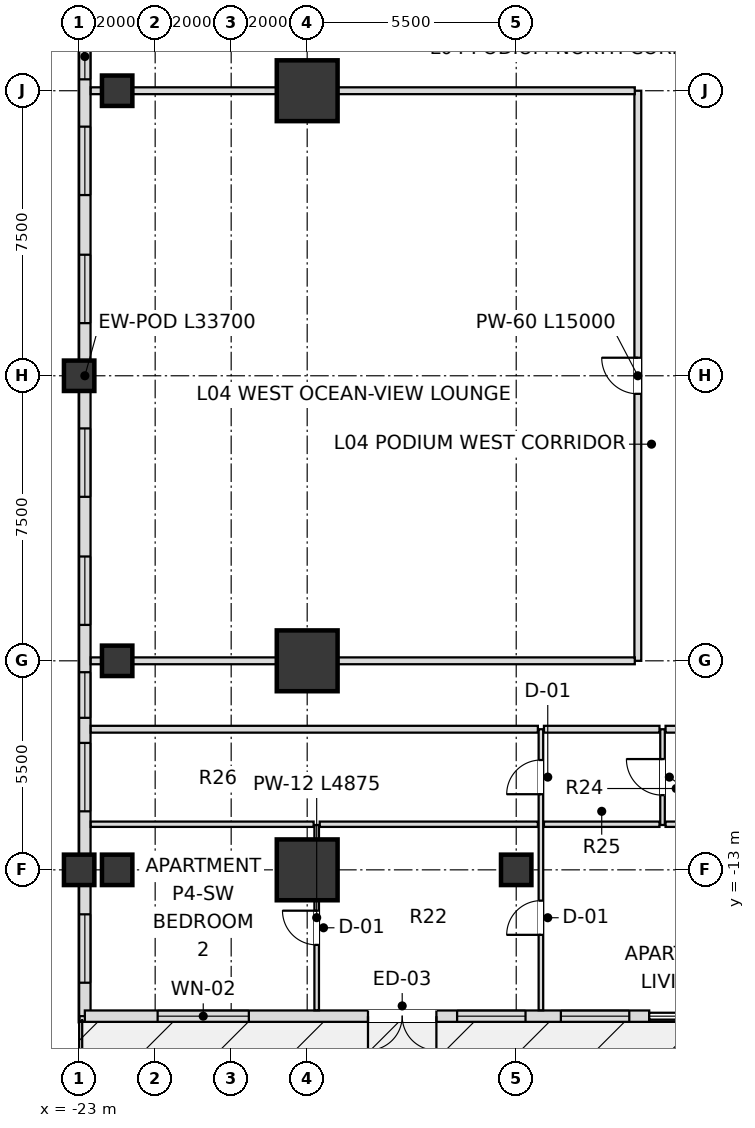
"""IFC4 building model, lengths in metres.
Left out: names, types, materials, properties, quantities, classifications, styles, units other than length and angle.
Written with IfcOpenShell. Run it as: python <this file> out.ifc"""

import sys

from ifc_helpers import new_model, si_unit, direction, frame, frame_2d, origin, origin_2d, place, context, subcontext, project, spatial, rectangle, extrude, element, fill, save


model = new_model("IFC4")
c1 = context("Model", 3, precision=1e-05, world=origin(), true_north=direction((0.0, 1.0)))
c2 = subcontext(c1, "Body", "Model", "MODEL_VIEW")
j1 = project(units=[si_unit("LENGTHUNIT", "METRE"), si_unit("PLANEANGLEUNIT", "RADIAN")], contexts=[c1])
p1 = place(None, origin())
s1 = spatial("IfcSite", under=j1, at=p1, CompositionType="ELEMENT")
p2 = place(p1, origin())
s2 = spatial("IfcBuilding", under=s1, at=p2, CompositionType="ELEMENT")
p3 = place(p2, frame((0.0, 0.0, 22.2)))
s3 = spatial("IfcBuildingStorey", under=s2, at=p3, CompositionType="ELEMENT", Elevation=22.2)
for number, where, z_axis, x_axis in (
    (1, (-17.0, 7.5, 0.0), (0.0, 0.0, 1.0), (1.0, 0.0, 0.0)),
    (2, (-17.0, -7.5, 0.0), (0.0, 0.0, 1.0), (1.0, 0.0, 0.0)),
    (3, (-17.0, -13.0, 0.0), (0.0, 0.0, 1.0), (1.0, 0.0, 0.0)),
):
    element("IfcColumn", number, at=place(p3, frame(where, z_axis=z_axis, x_axis=x_axis)), inside=s3, PredefinedType="USERDEFINED", context=c2, shape_type="SweptSolid", body=[
        extrude(rectangle(XDim=1.6, YDim=1.6, at=origin_2d()), origin(), (0.0, 0.0, 1.0), 5.4),
    ])
for number, where, z_axis, x_axis in (
    (4, (-23.0, -13.0, 0.0), (0.0, 0.0, 1.0), (1.0, 0.0, 0.0)),
    (5, (-23.0, 0.0, 0.0), (0.0, 0.0, 1.0), (1.0, 0.0, 0.0)),
    (6, (-11.5, -13.0, 0.0), (0.0, 0.0, 1.0), (1.0, 0.0, 0.0)),
    (7, (-22.0, -13.0, 0.0), (0.0, 0.0, 1.0), (1.0, 0.0, 0.0)),
    (8, (-22.0, -7.5, 0.0), (0.0, 0.0, 1.0), (1.0, 0.0, 0.0)),
    (9, (-22.0, 7.5, 0.0), (0.0, 0.0, 1.0), (1.0, 0.0, 0.0)),
):
    element("IfcColumn", number, at=place(p3, frame(where, z_axis=z_axis, x_axis=x_axis)), inside=s3, PredefinedType="COLUMN", context=c2, shape_type="SweptSolid", body=[
        extrude(rectangle(XDim=0.8, YDim=0.8, at=origin_2d()), origin(), (0.0, 0.0, 1.0), 5.4),
    ])
p4 = place(p3, frame((-22.85, 16.85, 0.0), z_axis=(0.0, 0.0, 1.0), x_axis=(0.0, -1.0, 0.0)))
e10 = element("IfcWall", 10, at=p4, inside=s3, PredefinedType="SOLIDWALL", context=c2, shape_type="SweptSolid", body=[
    extrude(rectangle(XDim=33.7, YDim=0.3, at=frame_2d((16.85, 0.0))), origin(), (0.0, 0.0, 1.0), 2.985),
])
p5 = place(p4, frame((0.88, 0.0, 0.72)))
e11 = element("IfcOpeningElement", 11, at=p5, cuts=e10, PredefinedType="OPENING", context=c2, shape_type="SweptSolid", body=[
    extrude(rectangle(XDim=1.8, YDim=1.68, at=frame_2d((0.9, 0.84))), frame((0.0, 0.16, 0.0), z_axis=(0.0, -1.0, 0.0), x_axis=(1.0, 0.0, 0.0)), (0.0, 0.0, 1.0), 0.32),
])
p6 = place(p4, frame((5.39, 0.0, 0.72)))
e12 = element("IfcOpeningElement", 12, at=p6, cuts=e10, PredefinedType="OPENING", context=c2, shape_type="SweptSolid", body=[
    extrude(rectangle(XDim=1.8, YDim=1.68, at=frame_2d((0.9, 0.84))), frame((0.0, 0.16, 0.0), z_axis=(0.0, -1.0, 0.0), x_axis=(1.0, 0.0, 0.0)), (0.0, 0.0, 1.0), 0.32),
])
p7 = place(p4, frame((7.85, 0.0, 0.72)))
e13 = element("IfcOpeningElement", 13, at=p7, cuts=e10, PredefinedType="OPENING", context=c2, shape_type="SweptSolid", body=[
    extrude(rectangle(XDim=1.2, YDim=1.68, at=frame_2d((0.6, 0.84))), frame((0.0, 0.16, 0.0), z_axis=(0.0, -1.0, 0.0), x_axis=(1.0, 0.0, 0.0)), (0.0, 0.0, 1.0), 0.32),
])
p8 = place(p4, frame((10.295, 0.0, 0.72)))
e14 = element("IfcOpeningElement", 14, at=p8, cuts=e10, PredefinedType="OPENING", context=c2, shape_type="SweptSolid", body=[
    extrude(rectangle(XDim=1.8, YDim=1.68, at=frame_2d((0.9, 0.84))), frame((0.0, 0.16, 0.0), z_axis=(0.0, -1.0, 0.0), x_axis=(1.0, 0.0, 0.0)), (0.0, 0.0, 1.0), 0.32),
])
p9 = place(p4, frame((13.665, 0.0, 0.72)))
e15 = element("IfcOpeningElement", 15, at=p9, cuts=e10, PredefinedType="OPENING", context=c2, shape_type="SweptSolid", body=[
    extrude(rectangle(XDim=1.8, YDim=1.68, at=frame_2d((0.9, 0.84))), frame((0.0, 0.16, 0.0), z_axis=(0.0, -1.0, 0.0), x_axis=(1.0, 0.0, 0.0)), (0.0, 0.0, 1.0), 0.32),
])
p10 = place(p4, frame((18.235, 0.0, 0.72)))
e16 = element("IfcOpeningElement", 16, at=p10, cuts=e10, PredefinedType="OPENING", context=c2, shape_type="SweptSolid", body=[
    extrude(rectangle(XDim=1.8, YDim=1.68, at=frame_2d((0.9, 0.84))), frame((0.0, 0.16, 0.0), z_axis=(0.0, -1.0, 0.0), x_axis=(1.0, 0.0, 0.0)), (0.0, 0.0, 1.0), 0.32),
])
p11 = place(p4, frame((21.605, 0.0, 0.72)))
e17 = element("IfcOpeningElement", 17, at=p11, cuts=e10, PredefinedType="OPENING", context=c2, shape_type="SweptSolid", body=[
    extrude(rectangle(XDim=1.8, YDim=1.68, at=frame_2d((0.9, 0.84))), frame((0.0, 0.16, 0.0), z_axis=(0.0, -1.0, 0.0), x_axis=(1.0, 0.0, 0.0)), (0.0, 0.0, 1.0), 0.32),
])
p12 = place(p4, frame((24.65, 0.0, 0.72)))
e18 = element("IfcOpeningElement", 18, at=p12, cuts=e10, PredefinedType="OPENING", context=c2, shape_type="SweptSolid", body=[
    extrude(rectangle(XDim=1.2, YDim=1.68, at=frame_2d((0.6, 0.84))), frame((0.0, 0.16, 0.0), z_axis=(0.0, -1.0, 0.0), x_axis=(1.0, 0.0, 0.0)), (0.0, 0.0, 1.0), 0.32),
])
p13 = place(p4, frame((26.51, 0.0, 0.72)))
e19 = element("IfcOpeningElement", 19, at=p13, cuts=e10, PredefinedType="OPENING", context=c2, shape_type="SweptSolid", body=[
    extrude(rectangle(XDim=1.8, YDim=1.68, at=frame_2d((0.9, 0.84))), frame((0.0, 0.16, 0.0), z_axis=(0.0, -1.0, 0.0), x_axis=(1.0, 0.0, 0.0)), (0.0, 0.0, 1.0), 0.32),
])
p14 = place(p4, frame((31.02, 0.0, 0.72)))
e20 = element("IfcOpeningElement", 20, at=p14, cuts=e10, PredefinedType="OPENING", context=c2, shape_type="SweptSolid", body=[
    extrude(rectangle(XDim=1.8, YDim=1.68, at=frame_2d((0.9, 0.84))), frame((0.0, 0.16, 0.0), z_axis=(0.0, -1.0, 0.0), x_axis=(1.0, 0.0, 0.0)), (0.0, 0.0, 1.0), 0.32),
])
p15 = place(p3, frame((-8.0, -16.85, 0.0), z_axis=(0.0, 0.0, 1.0), x_axis=(-1.0, 0.0, 0.0)))
e21 = element("IfcWall", 21, at=p15, inside=s3, PredefinedType="SOLIDWALL", context=c2, shape_type="SweptSolid", body=[
    extrude(rectangle(XDim=14.85, YDim=0.3, at=frame_2d((7.425, 0.0))), origin(), (0.0, 0.0, 1.0), 4.356),
])
p16 = place(p15, frame((5.6, 0.0, 0.0)))
e22 = element("IfcOpeningElement", 22, at=p16, cuts=e21, PredefinedType="OPENING", context=c2, shape_type="SweptSolid", body=[
    extrude(rectangle(XDim=1.8, YDim=2.3, at=frame_2d((0.9, 1.15))), frame((0.0, 0.16, 0.0), z_axis=(0.0, -1.0, 0.0), x_axis=(1.0, 0.0, 0.0)), (0.0, 0.0, 1.0), 0.32),
])
p17 = place(p15, frame((0.525, 0.0, 0.72)))
e23 = element("IfcOpeningElement", 23, at=p17, cuts=e21, PredefinedType="OPENING", context=c2, shape_type="SweptSolid", body=[
    extrude(rectangle(XDim=1.8, YDim=1.68, at=frame_2d((0.9, 0.84))), frame((0.0, 0.16, 0.0), z_axis=(0.0, -1.0, 0.0), x_axis=(1.0, 0.0, 0.0)), (0.0, 0.0, 1.0), 0.32),
])
p18 = place(p15, frame((3.255, 0.0, 0.72)))
e24 = element("IfcOpeningElement", 24, at=p18, cuts=e21, PredefinedType="OPENING", context=c2, shape_type="SweptSolid", body=[
    extrude(rectangle(XDim=1.8, YDim=1.68, at=frame_2d((0.9, 0.84))), frame((0.0, 0.16, 0.0), z_axis=(0.0, -1.0, 0.0), x_axis=(1.0, 0.0, 0.0)), (0.0, 0.0, 1.0), 0.32),
])
p19 = place(p15, frame((10.535, 0.0, 0.8)))
e25 = element("IfcOpeningElement", 25, at=p19, cuts=e21, PredefinedType="OPENING", context=c2, shape_type="SweptSolid", body=[
    extrude(rectangle(XDim=2.4, YDim=2.2, at=frame_2d((1.2, 1.1))), frame((0.0, 0.16, 0.0), z_axis=(0.0, -1.0, 0.0), x_axis=(1.0, 0.0, 0.0)), (0.0, 0.0, 1.0), 0.32),
])
p20 = place(p3, frame((-16.75, -16.695, 0.0), z_axis=(0.0, 0.0, 1.0), x_axis=(0.0, 1.0, 0.0)))
e26 = element("IfcWall", 26, at=p20, inside=s3, PredefinedType="PARTITIONING", context=c2, shape_type="SweptSolid", body=[
    extrude(rectangle(XDim=4.875, YDim=0.12, at=frame_2d((2.438, 0.0))), origin(), (0.0, 0.0, 1.0), 2.985),
])
p21 = place(p20, frame((1.721, 0.0, 0.0)))
e27 = element("IfcOpeningElement", 27, at=p21, cuts=e26, PredefinedType="OPENING", context=c2, shape_type="SweptSolid", body=[
    extrude(rectangle(XDim=0.9, YDim=2.1, at=frame_2d((0.45, 1.05))), frame((0.0, 0.07, 0.0), z_axis=(0.0, -1.0, 0.0), x_axis=(1.0, 0.0, 0.0)), (0.0, 0.0, 1.0), 0.14),
])
p22 = place(p3, frame((-10.85, -16.695, 0.0), z_axis=(0.0, 0.0, 1.0), x_axis=(0.0, 1.0, 0.0)))
e28 = element("IfcWall", 28, at=p22, inside=s3, PredefinedType="PARTITIONING", context=c2, shape_type="SweptSolid", body=[
    extrude(rectangle(XDim=7.395, YDim=0.12, at=frame_2d((3.698, 0.0))), origin(), (0.0, 0.0, 1.0), 4.436),
])
p23 = place(p22, frame((5.685, 0.0, 0.0)))
e29 = element("IfcOpeningElement", 29, at=p23, cuts=e28, PredefinedType="OPENING", context=c2, shape_type="SweptSolid", body=[
    extrude(rectangle(XDim=0.9, YDim=2.1, at=frame_2d((0.45, 1.05))), frame((0.0, 0.07, 0.0), z_axis=(0.0, -1.0, 0.0), x_axis=(1.0, 0.0, 0.0)), (0.0, 0.0, 1.0), 0.14),
])
p24 = place(p22, frame((1.985, 0.0, 0.0)))
e30 = element("IfcOpeningElement", 30, at=p24, cuts=e28, PredefinedType="OPENING", context=c2, shape_type="SweptSolid", body=[
    extrude(rectangle(XDim=0.9, YDim=2.1, at=frame_2d((0.45, 1.05))), frame((0.0, 0.07, 0.0), z_axis=(0.0, -1.0, 0.0), x_axis=(1.0, 0.0, 0.0)), (0.0, 0.0, 1.0), 0.14),
])
p25 = place(p3, frame((-8.3, -7.5, 0.0), z_axis=(0.0, 0.0, 1.0), x_axis=(0.0, 1.0, 0.0)))
e31 = element("IfcWall", 31, at=p25, inside=s3, PredefinedType="PARTITIONING", context=c2, shape_type="SweptSolid", body=[
    extrude(rectangle(XDim=15.0, YDim=0.18, at=frame_2d((7.5, 0.0))), origin(), (0.0, 0.0, 1.0), 5.0),
])
p26 = place(p25, frame((7.025, 0.0, 0.0)))
e32 = element("IfcOpeningElement", 32, at=p26, cuts=e31, PredefinedType="OPENING", context=c2, shape_type="SweptSolid", body=[
    extrude(rectangle(XDim=0.95, YDim=2.15, at=frame_2d((0.475, 1.075))), frame((0.0, 0.1, 0.0), z_axis=(0.0, -1.0, 0.0), x_axis=(1.0, 0.0, 0.0)), (0.0, 0.0, 1.0), 0.2),
])
p27 = place(p3, frame((-7.65, -11.82, 0.0), z_axis=(0.0, 0.0, 1.0), x_axis=(0.0, 1.0, 0.0)))
e33 = element("IfcWall", 33, at=p27, inside=s3, PredefinedType="PARTITIONING", context=c2, shape_type="SweptSolid", body=[
    extrude(rectangle(XDim=2.52, YDim=0.12, at=frame_2d((1.26, 0.0))), origin(), (0.0, 0.0, 1.0), 5.0),
])
p28 = place(p27, frame((0.785, 0.0, 0.0)))
e34 = element("IfcOpeningElement", 34, at=p28, cuts=e33, PredefinedType="OPENING", context=c2, shape_type="SweptSolid", body=[
    extrude(rectangle(XDim=0.95, YDim=2.1, at=frame_2d((0.475, 1.05))), frame((0.0, 0.07, 0.0), z_axis=(0.0, -1.0, 0.0), x_axis=(1.0, 0.0, 0.0)), (0.0, 0.0, 1.0), 0.14),
])
p29 = place(p3, frame((-22.695, -11.8, 0.0), z_axis=(0.0, 0.0, 1.0), x_axis=(1.0, 0.0, 0.0)))
e35 = element("IfcWall", 35, at=p29, inside=s3, PredefinedType="PARTITIONING", context=c2, shape_type="SweptSolid", body=[
    extrude(rectangle(XDim=5.865, YDim=0.14, at=frame_2d((2.933, 0.0))), origin(), (0.0, 0.0, 1.0), 4.356),
])
p30 = place(p3, frame((-16.67, -11.8, 0.0), z_axis=(0.0, 0.0, 1.0), x_axis=(1.0, 0.0, 0.0)))
e36 = element("IfcWall", 36, at=p30, inside=s3, PredefinedType="PARTITIONING", context=c2, shape_type="SweptSolid", body=[
    extrude(rectangle(XDim=5.74, YDim=0.14, at=frame_2d((2.87, 0.0))), origin(), (0.0, 0.0, 1.0), 5.0),
])
p31 = place(p3, frame((-10.77, -11.8, 0.0), z_axis=(0.0, 0.0, 1.0), x_axis=(1.0, 0.0, 0.0)))
e37 = element("IfcWall", 37, at=p31, inside=s3, PredefinedType="PARTITIONING", context=c2, shape_type="SweptSolid", body=[
    extrude(rectangle(XDim=3.04, YDim=0.14, at=frame_2d((1.52, 0.0))), origin(), (0.0, 0.0, 1.0), 5.0),
])
p32 = place(p3, frame((-7.57, -11.8, 0.0), z_axis=(0.0, 0.0, 1.0), x_axis=(1.0, 0.0, 0.0)))
e38 = element("IfcWall", 38, at=p32, inside=s3, PredefinedType="PARTITIONING", context=c2, shape_type="SweptSolid", body=[
    extrude(rectangle(XDim=4.04, YDim=0.14, at=frame_2d((2.02, 0.0))), origin(), (0.0, 0.0, 1.0), 4.436),
])
p33 = place(p32, frame((1.545, 0.0, 0.0)))
e39 = element("IfcOpeningElement", 39, at=p33, cuts=e38, PredefinedType="OPENING", context=c2, shape_type="SweptSolid", body=[
    extrude(rectangle(XDim=0.95, YDim=2.1, at=frame_2d((0.475, 1.05))), frame((0.0, 0.08, 0.0), z_axis=(0.0, -1.0, 0.0), x_axis=(1.0, 0.0, 0.0)), (0.0, 0.0, 1.0), 0.16),
])
p34 = place(p3, frame((-22.695, -9.3, 0.0), z_axis=(0.0, 0.0, 1.0), x_axis=(1.0, 0.0, 0.0)))
e40 = element("IfcWall", 40, at=p34, inside=s3, PredefinedType="PARTITIONING", context=c2, shape_type="SweptSolid", body=[
    extrude(rectangle(XDim=11.765, YDim=0.18, at=frame_2d((5.883, 0.0))), origin(), (0.0, 0.0, 1.0), 4.356),
])
p35 = place(p3, frame((-10.77, -9.3, 0.0), z_axis=(0.0, 0.0, 1.0), x_axis=(1.0, 0.0, 0.0)))
e41 = element("IfcWall", 41, at=p35, inside=s3, PredefinedType="PARTITIONING", context=c2, shape_type="SweptSolid", body=[
    extrude(rectangle(XDim=3.04, YDim=0.18, at=frame_2d((1.52, 0.0))), origin(), (0.0, 0.0, 1.0), 5.0),
])
p36 = place(p3, frame((-7.57, -9.3, 0.0), z_axis=(0.0, 0.0, 1.0), x_axis=(1.0, 0.0, 0.0)))
e42 = element("IfcWall", 42, at=p36, inside=s3, PredefinedType="PARTITIONING", context=c2, shape_type="SweptSolid", body=[
    extrude(rectangle(XDim=4.04, YDim=0.18, at=frame_2d((2.02, 0.0))), origin(), (0.0, 0.0, 1.0), 4.436),
])
p37 = place(p36, frame((1.545, 0.0, 0.0)))
e43 = element("IfcOpeningElement", 43, at=p37, cuts=e42, PredefinedType="OPENING", context=c2, shape_type="SweptSolid", body=[
    extrude(rectangle(XDim=0.95, YDim=2.15, at=frame_2d((0.475, 1.075))), frame((0.0, 0.1, 0.0), z_axis=(0.0, -1.0, 0.0), x_axis=(1.0, 0.0, 0.0)), (0.0, 0.0, 1.0), 0.2),
])
for number, where, z_axis, x_axis in (
    (44, (-22.695, -7.5, 0.0), (0.0, 0.0, 1.0), (1.0, 0.0, 0.0)),
    (45, (-22.695, 7.5, 0.0), (0.0, 0.0, 1.0), (1.0, 0.0, 0.0)),
):
    element("IfcWall", number, at=place(p3, frame(where, z_axis=z_axis, x_axis=x_axis)), inside=s3, PredefinedType="PARTITIONING", context=c2, shape_type="SweptSolid", body=[
        extrude(rectangle(XDim=14.315, YDim=0.18, at=frame_2d((7.158, 0.0))), origin(), (0.0, 0.0, 1.0), 4.356),
    ])
p38 = place(p7, origin())
e46 = element("IfcWindow", 46, at=p38, inside=s3, PartitioningType="SINGLE_PANEL", PredefinedType="WINDOW", context=c2, shape_type="SweptSolid", body=[
    extrude(rectangle(XDim=1.2, YDim=1.68, at=frame_2d((0.6, 0.84))), frame((0.0, 0.03, 0.0), z_axis=(0.0, -1.0, 0.0), x_axis=(1.0, 0.0, 0.0)), (0.0, 0.0, 1.0), 0.06),
])
fill(e13, e46)
p39 = place(p8, origin())
e47 = element("IfcWindow", 47, at=p39, inside=s3, PartitioningType="SINGLE_PANEL", PredefinedType="WINDOW", context=c2, shape_type="SweptSolid", body=[
    extrude(rectangle(XDim=1.8, YDim=1.68, at=frame_2d((0.9, 0.84))), frame((0.0, 0.03, 0.0), z_axis=(0.0, -1.0, 0.0), x_axis=(1.0, 0.0, 0.0)), (0.0, 0.0, 1.0), 0.06),
])
fill(e14, e47)
p40 = place(p9, origin())
e48 = element("IfcWindow", 48, at=p40, inside=s3, PartitioningType="SINGLE_PANEL", PredefinedType="WINDOW", context=c2, shape_type="SweptSolid", body=[
    extrude(rectangle(XDim=1.8, YDim=1.68, at=frame_2d((0.9, 0.84))), frame((0.0, 0.03, 0.0), z_axis=(0.0, -1.0, 0.0), x_axis=(1.0, 0.0, 0.0)), (0.0, 0.0, 1.0), 0.06),
])
fill(e15, e48)
p41 = place(p10, origin())
e49 = element("IfcWindow", 49, at=p41, inside=s3, PartitioningType="SINGLE_PANEL", PredefinedType="WINDOW", context=c2, shape_type="SweptSolid", body=[
    extrude(rectangle(XDim=1.8, YDim=1.68, at=frame_2d((0.9, 0.84))), frame((0.0, 0.03, 0.0), z_axis=(0.0, -1.0, 0.0), x_axis=(1.0, 0.0, 0.0)), (0.0, 0.0, 1.0), 0.06),
])
fill(e16, e49)
p42 = place(p11, origin())
e50 = element("IfcWindow", 50, at=p42, inside=s3, PartitioningType="SINGLE_PANEL", PredefinedType="WINDOW", context=c2, shape_type="SweptSolid", body=[
    extrude(rectangle(XDim=1.8, YDim=1.68, at=frame_2d((0.9, 0.84))), frame((0.0, 0.03, 0.0), z_axis=(0.0, -1.0, 0.0), x_axis=(1.0, 0.0, 0.0)), (0.0, 0.0, 1.0), 0.06),
])
fill(e17, e50)
p43 = place(p12, origin())
e51 = element("IfcWindow", 51, at=p43, inside=s3, PartitioningType="SINGLE_PANEL", PredefinedType="WINDOW", context=c2, shape_type="SweptSolid", body=[
    extrude(rectangle(XDim=1.2, YDim=1.68, at=frame_2d((0.6, 0.84))), frame((0.0, 0.03, 0.0), z_axis=(0.0, -1.0, 0.0), x_axis=(1.0, 0.0, 0.0)), (0.0, 0.0, 1.0), 0.06),
])
fill(e18, e51)
p44 = place(p13, origin())
e52 = element("IfcWindow", 52, at=p44, inside=s3, PartitioningType="SINGLE_PANEL", PredefinedType="WINDOW", context=c2, shape_type="SweptSolid", body=[
    extrude(rectangle(XDim=1.8, YDim=1.68, at=frame_2d((0.9, 0.84))), frame((0.0, 0.03, 0.0), z_axis=(0.0, -1.0, 0.0), x_axis=(1.0, 0.0, 0.0)), (0.0, 0.0, 1.0), 0.06),
])
fill(e19, e52)
p45 = place(p14, origin())
e53 = element("IfcWindow", 53, at=p45, inside=s3, PartitioningType="SINGLE_PANEL", PredefinedType="WINDOW", context=c2, shape_type="SweptSolid", body=[
    extrude(rectangle(XDim=1.8, YDim=1.68, at=frame_2d((0.9, 0.84))), frame((0.0, 0.03, 0.0), z_axis=(0.0, -1.0, 0.0), x_axis=(1.0, 0.0, 0.0)), (0.0, 0.0, 1.0), 0.06),
])
fill(e20, e53)
p46 = place(p16, origin())
e54 = element("IfcDoor", 54, at=p46, inside=s3, OperationType="DOUBLE_DOOR_SINGLE_SWING", PredefinedType="DOOR", context=c2, shape_type="SweptSolid", body=[
    extrude(rectangle(XDim=1.8, YDim=2.3, at=frame_2d((0.9, 1.15))), frame((0.0, 0.025, 0.0), z_axis=(0.0, -1.0, 0.0), x_axis=(1.0, 0.0, 0.0)), (0.0, 0.0, 1.0), 0.05),
])
fill(e22, e54)
p47 = place(p17, origin())
e55 = element("IfcWindow", 55, at=p47, inside=s3, PartitioningType="SINGLE_PANEL", PredefinedType="WINDOW", context=c2, shape_type="SweptSolid", body=[
    extrude(rectangle(XDim=1.8, YDim=1.68, at=frame_2d((0.9, 0.84))), frame((0.0, 0.03, 0.0), z_axis=(0.0, -1.0, 0.0), x_axis=(1.0, 0.0, 0.0)), (0.0, 0.0, 1.0), 0.06),
])
fill(e23, e55)
p48 = place(p18, origin())
e56 = element("IfcWindow", 56, at=p48, inside=s3, PartitioningType="SINGLE_PANEL", PredefinedType="WINDOW", context=c2, shape_type="SweptSolid", body=[
    extrude(rectangle(XDim=1.8, YDim=1.68, at=frame_2d((0.9, 0.84))), frame((0.0, 0.03, 0.0), z_axis=(0.0, -1.0, 0.0), x_axis=(1.0, 0.0, 0.0)), (0.0, 0.0, 1.0), 0.06),
])
fill(e24, e56)
p49 = place(p19, origin())
e57 = element("IfcWindow", 57, at=p49, inside=s3, PartitioningType="SINGLE_PANEL", PredefinedType="WINDOW", context=c2, shape_type="SweptSolid", body=[
    extrude(rectangle(XDim=2.4, YDim=2.2, at=frame_2d((1.2, 1.1))), frame((0.0, 0.03, 0.0), z_axis=(0.0, -1.0, 0.0), x_axis=(1.0, 0.0, 0.0)), (0.0, 0.0, 1.0), 0.06),
])
fill(e25, e57)
p50 = place(p28, origin())
e58 = element("IfcDoor", 58, at=p50, inside=s3, OperationType="SINGLE_SWING_RIGHT", PredefinedType="DOOR", context=c2, shape_type="SweptSolid", body=[
    extrude(rectangle(XDim=0.95, YDim=2.1, at=frame_2d((0.475, 1.05))), frame((0.0, 0.025, 0.0), z_axis=(0.0, -1.0, 0.0), x_axis=(1.0, 0.0, 0.0)), (0.0, 0.0, 1.0), 0.05),
])
fill(e34, e58)
p51 = place(p23, origin())
e59 = element("IfcDoor", 59, at=p51, inside=s3, OperationType="SINGLE_SWING_LEFT", PredefinedType="DOOR", context=c2, shape_type="SweptSolid", body=[
    extrude(rectangle(XDim=0.9, YDim=2.1, at=frame_2d((0.45, 1.05))), frame((0.0, 0.025, 0.0), z_axis=(0.0, -1.0, 0.0), x_axis=(1.0, 0.0, 0.0)), (0.0, 0.0, 1.0), 0.05),
])
fill(e29, e59)
p52 = place(p24, origin())
e60 = element("IfcDoor", 60, at=p52, inside=s3, OperationType="SINGLE_SWING_LEFT", PredefinedType="DOOR", context=c2, shape_type="SweptSolid", body=[
    extrude(rectangle(XDim=0.9, YDim=2.1, at=frame_2d((0.45, 1.05))), frame((0.0, 0.025, 0.0), z_axis=(0.0, -1.0, 0.0), x_axis=(1.0, 0.0, 0.0)), (0.0, 0.0, 1.0), 0.05),
])
fill(e30, e60)
p53 = place(p21, origin())
e61 = element("IfcDoor", 61, at=p53, inside=s3, OperationType="SINGLE_SWING_RIGHT", PredefinedType="DOOR", context=c2, shape_type="SweptSolid", body=[
    extrude(rectangle(XDim=0.9, YDim=2.1, at=frame_2d((0.45, 1.05))), frame((0.0, 0.025, 0.0), z_axis=(0.0, -1.0, 0.0), x_axis=(1.0, 0.0, 0.0)), (0.0, 0.0, 1.0), 0.05),
])
fill(e27, e61)
p54 = place(p26, origin())
e62 = element("IfcDoor", 62, at=p54, inside=s3, OperationType="SINGLE_SWING_RIGHT", PredefinedType="DOOR", context=c2, shape_type="SweptSolid", body=[
    extrude(rectangle(XDim=0.95, YDim=2.15, at=frame_2d((0.475, 1.075))), frame((0.0, 0.025, 0.0), z_axis=(0.0, -1.0, 0.0), x_axis=(1.0, 0.0, 0.0)), (0.0, 0.0, 1.0), 0.05),
])
fill(e32, e62)
save(model, sys.argv[1])
